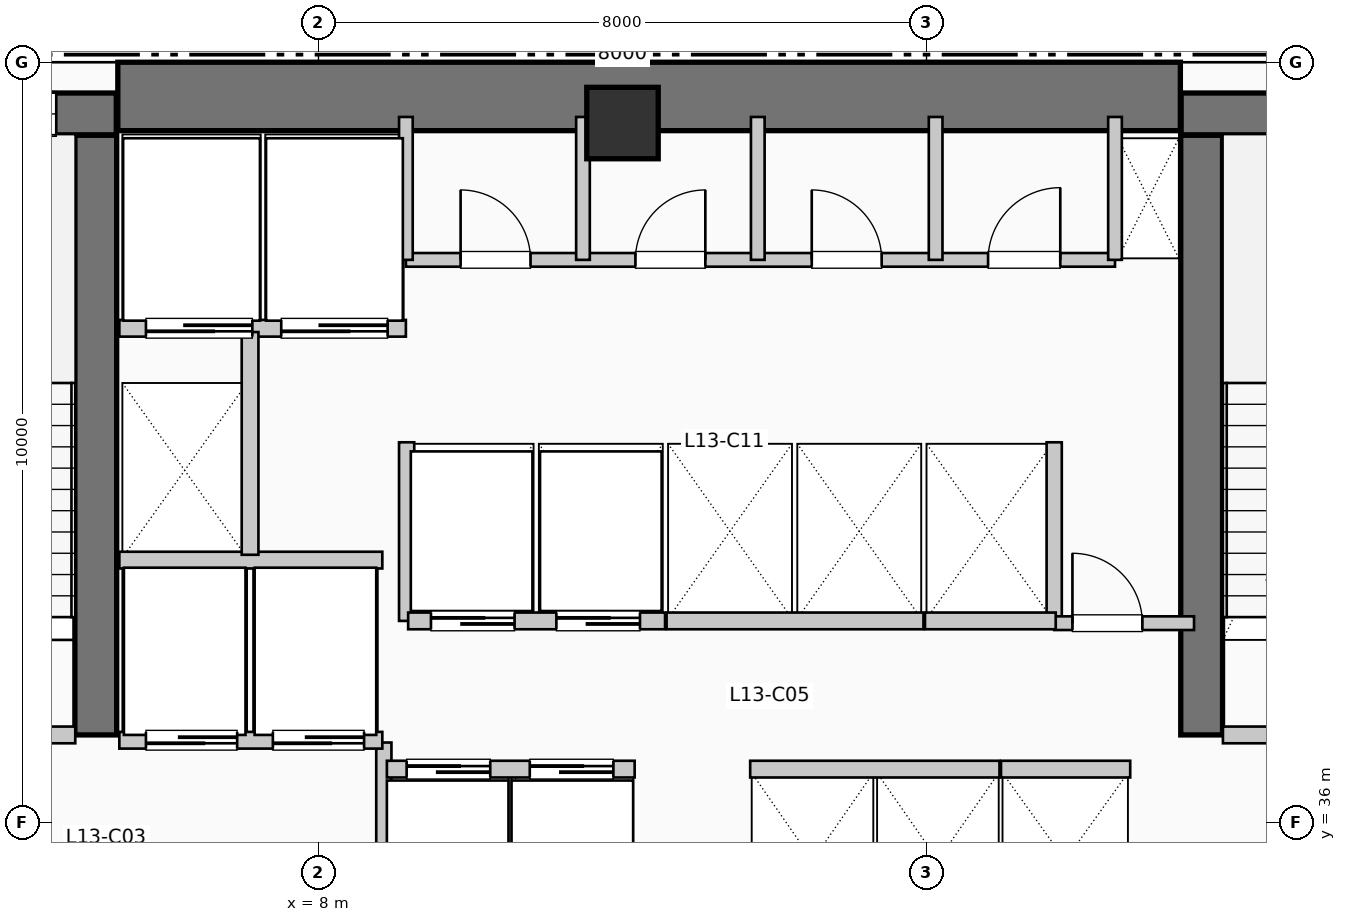
"""IFC4 building model, lengths in metres.
Left out: names, types, materials, properties, quantities, classifications, styles, units other than length and angle.
Written with IfcOpenShell. Run it as: python <this file> out.ifc"""

import sys

from ifc_helpers import new_model, si_unit, direction, frame, frame_2d, origin, origin_2d, place, context, subcontext, project, spatial, rectangle, extrude, element, fill, save


model = new_model("IFC4")
c1 = context("Model", 3, precision=1e-05, world=origin(), true_north=direction((0.0, 1.0)))
c2 = subcontext(c1, "Body", "Model", "MODEL_VIEW")
j1 = project(units=[si_unit("LENGTHUNIT", "METRE"), si_unit("PLANEANGLEUNIT", "RADIAN")], contexts=[c1])
p1 = place(None, origin())
s1 = spatial("IfcSite", under=j1, at=p1, CompositionType="ELEMENT")
p2 = place(p1, origin())
s2 = spatial("IfcBuilding", under=s1, at=p2, CompositionType="ELEMENT")
p3 = place(p2, frame((0.0, 0.0, 58.08)))
s3 = spatial("IfcBuildingStorey", under=s2, at=p3, CompositionType="ELEMENT", Elevation=58.08)
p4 = place(p3, frame((5.36, 45.55, 0.0), z_axis=(0.0, 0.0, 1.0), x_axis=(1.0, 0.0, 0.0)))
e1 = element("IfcWall", 1, at=p4, inside=s3, PredefinedType="SHEAR", context=c2, shape_type="SweptSolid", body=[
    extrude(rectangle(XDim=13.98, YDim=0.9, at=frame_2d((6.99, 0.0))), origin(), (0.0, 0.0, 1.0), 3.96),
])
p5 = place(p3, frame((5.07, 37.15, 0.0), z_axis=(0.0, 0.0, 1.0), x_axis=(0.0, 1.0, 0.0)))
e2 = element("IfcWall", 2, at=p5, inside=s3, PredefinedType="SHEAR", context=c2, shape_type="SweptSolid", body=[
    extrude(rectangle(XDim=7.89, YDim=0.55, at=frame_2d((3.945, 0.0))), origin(), (0.0, 0.0, 1.0), 3.96),
])
p6 = place(p3, frame((1.1, 45.32, 0.0), z_axis=(0.0, 0.0, 1.0), x_axis=(1.0, 0.0, 0.0)))
e3 = element("IfcWall", 3, at=p6, inside=s3, PredefinedType="SHEAR", context=c2, shape_type="SweptSolid", body=[
    extrude(rectangle(XDim=4.24, YDim=0.55, at=frame_2d((2.12, 0.0))), origin(), (0.0, 0.0, 1.0), 3.96),
])
p7 = place(p6, frame((2.05, 0.0, 1.05)))
e4 = element("IfcOpeningElement", 4, at=p7, cuts=e3, PredefinedType="OPENING", context=c2, shape_type="SweptSolid", body=[
    extrude(rectangle(XDim=1.4, YDim=1.8, at=frame_2d((0.7, 0.9))), frame((0.0, 0.285, 0.0), z_axis=(0.0, -1.0, 0.0), x_axis=(1.0, 0.0, 0.0)), (0.0, 0.0, 1.0), 0.57),
])
p8 = place(p3, frame((19.62, 37.15, 0.0), z_axis=(0.0, 0.0, 1.0), x_axis=(0.0, 1.0, 0.0)))
e5 = element("IfcWall", 5, at=p8, inside=s3, PredefinedType="SHEAR", context=c2, shape_type="SweptSolid", body=[
    extrude(rectangle(XDim=7.89, YDim=0.55, at=frame_2d((3.945, 0.0))), origin(), (0.0, 0.0, 1.0), 3.96),
])
p9 = place(p3, frame((19.35, 45.32, 0.0), z_axis=(0.0, 0.0, 1.0), x_axis=(1.0, 0.0, 0.0)))
e6 = element("IfcWall", 6, at=p9, inside=s3, PredefinedType="SHEAR", context=c2, shape_type="SweptSolid", body=[
    extrude(rectangle(XDim=3.69, YDim=0.55, at=frame_2d((1.845, 0.0))), origin(), (0.0, 0.0, 1.0), 3.96),
])
p10 = place(p9, frame((1.15, 0.0, 1.05)))
e7 = element("IfcOpeningElement", 7, at=p10, cuts=e6, PredefinedType="OPENING", context=c2, shape_type="SweptSolid", body=[
    extrude(rectangle(XDim=1.4, YDim=1.8, at=frame_2d((0.7, 0.9))), frame((0.0, 0.285, 0.0), z_axis=(0.0, -1.0, 0.0), x_axis=(1.0, 0.0, 0.0)), (0.0, 0.0, 1.0), 0.57),
])
p11 = place(p3, frame((12.0, 45.2, 0.0), z_axis=(0.0, 0.0, 1.0), x_axis=(1.0, 0.0, 0.0)))
e8 = element("IfcColumn", 8, at=p11, inside=s3, PredefinedType="COLUMN", context=c2, shape_type="SweptSolid", body=[
    extrude(rectangle(XDim=0.94, YDim=0.94, at=origin_2d()), origin(), (0.0, 0.0, 1.0), 3.96),
])
p12 = place(p3, frame((1.65, 37.15, 0.0), z_axis=(0.0, 0.0, 1.0), x_axis=(1.0, 0.0, 0.0)))
e9 = element("IfcWall", 9, at=p12, inside=s3, PredefinedType="PARTITIONING", context=c2, shape_type="SweptSolid", body=[
    extrude(rectangle(XDim=3.15, YDim=0.22, at=frame_2d((1.575, 0.0))), origin(), (0.0, 0.0, 1.0), 3.71),
])
p13 = place(p12, frame((2.05, 0.0, 0.0), z_axis=(0.0, 0.0, 1.0), x_axis=(-1.0, 0.0, 0.0)))
e10 = element("IfcOpeningElement", 10, at=p13, cuts=e9, PredefinedType="OPENING", context=c2, shape_type="SweptSolid", body=[
    extrude(rectangle(XDim=1.05, YDim=2.15, at=frame_2d((0.525, 1.075))), frame((0.0, 0.12, 0.0), z_axis=(0.0, -1.0, 0.0), x_axis=(1.0, 0.0, 0.0)), (0.0, 0.0, 1.0), 0.24),
])
p14 = place(p3, frame((8.86, 34.55, 0.0), z_axis=(0.0, 0.0, 1.0), x_axis=(0.0, 1.0, 0.0)))
e11 = element("IfcWall", 11, at=p14, inside=s3, PredefinedType="PARTITIONING", context=c2, shape_type="SweptSolid", body=[
    extrude(rectangle(XDim=2.5, YDim=0.2, at=frame_2d((1.25, 0.0))), origin(), (0.0, 0.0, 1.0), 3.71),
])
p15 = place(p3, frame((19.9, 37.15, 0.0), z_axis=(0.0, 0.0, 1.0), x_axis=(1.0, 0.0, 0.0)))
e12 = element("IfcWall", 12, at=p15, inside=s3, PredefinedType="PARTITIONING", context=c2, shape_type="SweptSolid", body=[
    extrude(rectangle(XDim=3.15, YDim=0.22, at=frame_2d((1.575, 0.0))), origin(), (0.0, 0.0, 1.0), 3.71),
])
p16 = place(p15, frame((2.05, 0.0, 0.0), z_axis=(0.0, 0.0, 1.0), x_axis=(-1.0, 0.0, 0.0)))
e13 = element("IfcOpeningElement", 13, at=p16, cuts=e12, PredefinedType="OPENING", context=c2, shape_type="SweptSolid", body=[
    extrude(rectangle(XDim=1.05, YDim=2.15, at=frame_2d((0.525, 1.075))), frame((0.0, 0.12, 0.0), z_axis=(0.0, -1.0, 0.0), x_axis=(1.0, 0.0, 0.0)), (0.0, 0.0, 1.0), 0.24),
])
p17 = place(p3, frame((5.38, 37.08, 0.0), z_axis=(0.0, 0.0, 1.0), x_axis=(1.0, 0.0, 0.0)))
e14 = element("IfcWall", 14, at=p17, inside=s3, PredefinedType="PARTITIONING", context=c2, shape_type="SweptSolid", body=[
    extrude(rectangle(XDim=3.46, YDim=0.22, at=frame_2d((1.73, 0.0))), origin(), (0.0, 0.0, 1.0), 3.71),
])
p18 = place(p17, frame((1.55, 0.0, 0.0), z_axis=(0.0, 0.0, 1.0), x_axis=(-1.0, 0.0, 0.0)))
e15 = element("IfcOpeningElement", 15, at=p18, cuts=e14, PredefinedType="OPENING", context=c2, shape_type="SweptSolid", body=[
    extrude(rectangle(XDim=1.2, YDim=2.2, at=frame_2d((0.6, 1.1))), frame((0.0, 0.12, 0.0), z_axis=(0.0, -1.0, 0.0), x_axis=(1.0, 0.0, 0.0)), (0.0, 0.0, 1.0), 0.24),
])
p19 = place(p17, frame((3.22, 0.0, 0.0), z_axis=(0.0, 0.0, 1.0), x_axis=(-1.0, 0.0, 0.0)))
e16 = element("IfcOpeningElement", 16, at=p19, cuts=e14, PredefinedType="OPENING", context=c2, shape_type="SweptSolid", body=[
    extrude(rectangle(XDim=1.2, YDim=2.2, at=frame_2d((0.6, 1.1))), frame((0.0, 0.12, 0.0), z_axis=(0.0, -1.0, 0.0), x_axis=(1.0, 0.0, 0.0)), (0.0, 0.0, 1.0), 0.24),
])
p20 = place(p3, frame((5.38, 39.45, 0.0), z_axis=(0.0, 0.0, 1.0), x_axis=(1.0, 0.0, 0.0)))
e17 = element("IfcWall", 17, at=p20, inside=s3, PredefinedType="PARTITIONING", context=c2, shape_type="SweptSolid", body=[
    extrude(rectangle(XDim=3.46, YDim=0.22, at=frame_2d((1.73, 0.0))), origin(), (0.0, 0.0, 1.0), 3.71),
])
p21 = place(p3, frame((5.38, 42.5, 0.0), z_axis=(0.0, 0.0, 1.0), x_axis=(1.0, 0.0, 0.0)))
e18 = element("IfcWall", 18, at=p21, inside=s3, PredefinedType="PARTITIONING", context=c2, shape_type="SweptSolid", body=[
    extrude(rectangle(XDim=3.77, YDim=0.22, at=frame_2d((1.885, 0.0))), origin(), (0.0, 0.0, 1.0), 3.71),
])
p22 = place(p21, frame((1.75, 0.0, 0.0), z_axis=(0.0, 0.0, 1.0), x_axis=(-1.0, 0.0, 0.0)))
e19 = element("IfcOpeningElement", 19, at=p22, cuts=e18, PredefinedType="OPENING", context=c2, shape_type="SweptSolid", body=[
    extrude(rectangle(XDim=1.4, YDim=2.2, at=frame_2d((0.7, 1.1))), frame((0.0, 0.12, 0.0), z_axis=(0.0, -1.0, 0.0), x_axis=(1.0, 0.0, 0.0)), (0.0, 0.0, 1.0), 0.24),
])
p23 = place(p21, frame((3.53, 0.0, 0.0), z_axis=(0.0, 0.0, 1.0), x_axis=(-1.0, 0.0, 0.0)))
e20 = element("IfcOpeningElement", 20, at=p23, cuts=e18, PredefinedType="OPENING", context=c2, shape_type="SweptSolid", body=[
    extrude(rectangle(XDim=1.4, YDim=2.2, at=frame_2d((0.7, 1.1))), frame((0.0, 0.12, 0.0), z_axis=(0.0, -1.0, 0.0), x_axis=(1.0, 0.0, 0.0)), (0.0, 0.0, 1.0), 0.24),
])
p24 = place(p3, frame((7.1, 39.52, 0.0), z_axis=(0.0, 0.0, 1.0), x_axis=(0.0, 1.0, 0.0)))
e21 = element("IfcWall", 21, at=p24, inside=s3, PredefinedType="PARTITIONING", context=c2, shape_type="SweptSolid", body=[
    extrude(rectangle(XDim=2.93, YDim=0.22, at=frame_2d((1.465, 0.0))), origin(), (0.0, 0.0, 1.0), 3.71),
])
for number, where, z_axis, x_axis in (
    (22, (9.16, 38.65, 0.0), (0.0, 0.0, 1.0), (0.0, 1.0, 0.0)),
    (23, (17.68, 38.65, 0.0), (0.0, 0.0, 1.0), (0.0, 1.0, 0.0)),
):
    element("IfcWall", number, at=place(p3, frame(where, z_axis=z_axis, x_axis=x_axis)), inside=s3, PredefinedType="PARTITIONING", context=c2, shape_type="SweptSolid", body=[
        extrude(rectangle(XDim=2.35, YDim=0.2, at=frame_2d((1.175, 0.0))), origin(), (0.0, 0.0, 1.0), 3.71),
    ])
p25 = place(p3, frame((17.68, 38.62, 0.0), z_axis=(0.0, 0.0, 1.0), x_axis=(1.0, 0.0, 0.0)))
e24 = element("IfcWall", 24, at=p25, inside=s3, PredefinedType="PARTITIONING", context=c2, shape_type="SweptSolid", body=[
    extrude(rectangle(XDim=1.84, YDim=0.18, at=frame_2d((0.92, 0.0))), origin(), (0.0, 0.0, 1.0), 3.71),
])
p26 = place(p25, frame((0.24, 0.0, 0.0)))
e25 = element("IfcOpeningElement", 25, at=p26, cuts=e24, PredefinedType="OPENING", context=c2, shape_type="SweptSolid", body=[
    extrude(rectangle(XDim=0.92, YDim=2.1, at=frame_2d((0.46, 1.05))), frame((0.0, 0.1, 0.0), z_axis=(0.0, -1.0, 0.0), x_axis=(1.0, 0.0, 0.0)), (0.0, 0.0, 1.0), 0.2),
])
p27 = place(p3, frame((8.9, 36.7, 0.0), z_axis=(0.0, 0.0, 1.0), x_axis=(1.0, 0.0, 0.0)))
e26 = element("IfcWall", 26, at=p27, inside=s3, PredefinedType="PARTITIONING", context=c2, shape_type="SweptSolid", body=[
    extrude(rectangle(XDim=3.26, YDim=0.22, at=frame_2d((1.63, 0.0))), origin(), (0.0, 0.0, 1.0), 3.71),
])
p28 = place(p27, frame((0.26, 0.0, 0.0)))
e27 = element("IfcOpeningElement", 27, at=p28, cuts=e26, PredefinedType="OPENING", context=c2, shape_type="SweptSolid", body=[
    extrude(rectangle(XDim=1.1, YDim=2.2, at=frame_2d((0.55, 1.1))), frame((0.0, 0.12, 0.0), z_axis=(0.0, -1.0, 0.0), x_axis=(1.0, 0.0, 0.0)), (0.0, 0.0, 1.0), 0.24),
])
p29 = place(p27, frame((1.88, 0.0, 0.0)))
e28 = element("IfcOpeningElement", 28, at=p29, cuts=e26, PredefinedType="OPENING", context=c2, shape_type="SweptSolid", body=[
    extrude(rectangle(XDim=1.1, YDim=2.2, at=frame_2d((0.55, 1.1))), frame((0.0, 0.12, 0.0), z_axis=(0.0, -1.0, 0.0), x_axis=(1.0, 0.0, 0.0)), (0.0, 0.0, 1.0), 0.24),
])
p30 = place(p3, frame((9.18, 38.65, 0.0), z_axis=(0.0, 0.0, 1.0), x_axis=(1.0, 0.0, 0.0)))
e29 = element("IfcWall", 29, at=p30, inside=s3, PredefinedType="PARTITIONING", context=c2, shape_type="SweptSolid", body=[
    extrude(rectangle(XDim=3.38, YDim=0.22, at=frame_2d((1.69, 0.0))), origin(), (0.0, 0.0, 1.0), 3.71),
])
p31 = place(p30, frame((0.3, 0.0, 0.0)))
e30 = element("IfcOpeningElement", 30, at=p31, cuts=e29, PredefinedType="OPENING", context=c2, shape_type="SweptSolid", body=[
    extrude(rectangle(XDim=1.1, YDim=2.2, at=frame_2d((0.55, 1.1))), frame((0.0, 0.12, 0.0), z_axis=(0.0, -1.0, 0.0), x_axis=(1.0, 0.0, 0.0)), (0.0, 0.0, 1.0), 0.24),
])
p32 = place(p30, frame((1.95, 0.0, 0.0)))
e31 = element("IfcOpeningElement", 31, at=p32, cuts=e29, PredefinedType="OPENING", context=c2, shape_type="SweptSolid", body=[
    extrude(rectangle(XDim=1.1, YDim=2.2, at=frame_2d((0.55, 1.1))), frame((0.0, 0.12, 0.0), z_axis=(0.0, -1.0, 0.0), x_axis=(1.0, 0.0, 0.0)), (0.0, 0.0, 1.0), 0.24),
])
p33 = place(p3, frame((13.68, 36.7, 0.0), z_axis=(0.0, 0.0, 1.0), x_axis=(1.0, 0.0, 0.0)))
e32 = element("IfcWall", 32, at=p33, inside=s3, PredefinedType="PARTITIONING", context=c2, shape_type="SweptSolid", body=[
    extrude(rectangle(XDim=3.28, YDim=0.22, at=frame_2d((1.64, 0.0))), origin(), (0.0, 0.0, 1.0), 3.71),
])
p34 = place(p3, frame((12.58, 38.65, 0.0), z_axis=(0.0, 0.0, 1.0), x_axis=(1.0, 0.0, 0.0)))
e33 = element("IfcWall", 33, at=p34, inside=s3, PredefinedType="PARTITIONING", context=c2, shape_type="SweptSolid", body=[
    extrude(rectangle(XDim=3.38, YDim=0.22, at=frame_2d((1.69, 0.0))), origin(), (0.0, 0.0, 1.0), 3.71),
])
p35 = place(p3, frame((16.98, 36.7, 0.0), z_axis=(0.0, 0.0, 1.0), x_axis=(1.0, 0.0, 0.0)))
e34 = element("IfcWall", 34, at=p35, inside=s3, PredefinedType="PARTITIONING", context=c2, shape_type="SweptSolid", body=[
    extrude(rectangle(XDim=1.7, YDim=0.22, at=frame_2d((0.85, 0.0))), origin(), (0.0, 0.0, 1.0), 3.71),
])
p36 = place(p3, frame((15.98, 38.65, 0.0), z_axis=(0.0, 0.0, 1.0), x_axis=(1.0, 0.0, 0.0)))
e35 = element("IfcWall", 35, at=p36, inside=s3, PredefinedType="PARTITIONING", context=c2, shape_type="SweptSolid", body=[
    extrude(rectangle(XDim=1.72, YDim=0.22, at=frame_2d((0.86, 0.0))), origin(), (0.0, 0.0, 1.0), 3.71),
])
p37 = place(p3, frame((9.15, 43.4, 0.0), z_axis=(0.0, 0.0, 1.0), x_axis=(1.0, 0.0, 0.0)))
e36 = element("IfcWall", 36, at=p37, inside=s3, PredefinedType="PLUMBINGWALL", context=c2, shape_type="SweptSolid", body=[
    extrude(rectangle(XDim=9.33, YDim=0.18, at=frame_2d((4.665, 0.0))), origin(), (0.0, 0.0, 1.0), 3.71),
])
p38 = place(p37, frame((0.72, 0.0, 0.0)))
e37 = element("IfcOpeningElement", 37, at=p38, cuts=e36, PredefinedType="OPENING", context=c2, shape_type="SweptSolid", body=[
    extrude(rectangle(XDim=0.92, YDim=2.1, at=frame_2d((0.46, 1.05))), frame((0.0, 0.1, 0.0), z_axis=(0.0, -1.0, 0.0), x_axis=(1.0, 0.0, 0.0)), (0.0, 0.0, 1.0), 0.2),
])
p39 = place(p37, frame((3.02, 0.0, 0.0)))
e38 = element("IfcOpeningElement", 38, at=p39, cuts=e36, PredefinedType="OPENING", context=c2, shape_type="SweptSolid", body=[
    extrude(rectangle(XDim=0.92, YDim=2.1, at=frame_2d((0.46, 1.05))), frame((0.0, 0.1, 0.0), z_axis=(0.0, -1.0, 0.0), x_axis=(1.0, 0.0, 0.0)), (0.0, 0.0, 1.0), 0.2),
])
p40 = place(p37, frame((5.34, 0.0, 0.0)))
e39 = element("IfcOpeningElement", 39, at=p40, cuts=e36, PredefinedType="OPENING", context=c2, shape_type="SweptSolid", body=[
    extrude(rectangle(XDim=0.92, YDim=2.1, at=frame_2d((0.46, 1.05))), frame((0.0, 0.1, 0.0), z_axis=(0.0, -1.0, 0.0), x_axis=(1.0, 0.0, 0.0)), (0.0, 0.0, 1.0), 0.2),
])
p41 = place(p37, frame((7.66, 0.0, 0.0)))
e40 = element("IfcOpeningElement", 40, at=p41, cuts=e36, PredefinedType="OPENING", context=c2, shape_type="SweptSolid", body=[
    extrude(rectangle(XDim=0.95, YDim=2.1, at=frame_2d((0.475, 1.05))), frame((0.0, 0.1, 0.0), z_axis=(0.0, -1.0, 0.0), x_axis=(1.0, 0.0, 0.0)), (0.0, 0.0, 1.0), 0.2),
])
for number, where, z_axis, x_axis in (
    (41, (9.15, 43.4, 0.0), (0.0, 0.0, 1.0), (0.0, 1.0, 0.0)),
    (42, (18.48, 43.4, 0.0), (0.0, 0.0, 1.0), (0.0, 1.0, 0.0)),
    (43, (11.48, 43.4, 0.0), (0.0, 0.0, 1.0), (0.0, 1.0, 0.0)),
    (44, (13.78, 43.4, 0.0), (0.0, 0.0, 1.0), (0.0, 1.0, 0.0)),
    (45, (16.12, 43.4, 0.0), (0.0, 0.0, 1.0), (0.0, 1.0, 0.0)),
):
    element("IfcWall", number, at=place(p3, frame(where, z_axis=z_axis, x_axis=x_axis)), inside=s3, PredefinedType="PLUMBINGWALL", context=c2, shape_type="SweptSolid", body=[
        extrude(rectangle(XDim=1.88, YDim=0.18, at=frame_2d((0.94, 0.0))), origin(), (0.0, 0.0, 1.0), 3.71),
    ])
p42 = place(p7, origin())
e46 = element("IfcWindow", 46, at=p42, inside=s3, PartitioningType="SINGLE_PANEL", PredefinedType="WINDOW", context=c2, shape_type="SweptSolid", body=[
    extrude(rectangle(XDim=1.4, YDim=1.8, at=frame_2d((0.7, 0.9))), frame((0.0, 0.03, 0.0), z_axis=(0.0, -1.0, 0.0), x_axis=(1.0, 0.0, 0.0)), (0.0, 0.0, 1.0), 0.06),
])
fill(e4, e46)
p43 = place(p18, origin())
e47 = element("IfcDoor", 47, at=p43, inside=s3, OperationType="SLIDING_TO_RIGHT", PredefinedType="DOOR", context=c2, shape_type="SweptSolid", body=[
    extrude(rectangle(XDim=1.2, YDim=2.2, at=frame_2d((0.6, 1.1))), frame((0.0, 0.025, 0.0), z_axis=(0.0, -1.0, 0.0), x_axis=(1.0, 0.0, 0.0)), (0.0, 0.0, 1.0), 0.05),
])
fill(e15, e47)
p44 = place(p19, origin())
e48 = element("IfcDoor", 48, at=p44, inside=s3, OperationType="SLIDING_TO_RIGHT", PredefinedType="DOOR", context=c2, shape_type="SweptSolid", body=[
    extrude(rectangle(XDim=1.2, YDim=2.2, at=frame_2d((0.6, 1.1))), frame((0.0, 0.025, 0.0), z_axis=(0.0, -1.0, 0.0), x_axis=(1.0, 0.0, 0.0)), (0.0, 0.0, 1.0), 0.05),
])
fill(e16, e48)
p45 = place(p22, origin())
e49 = element("IfcDoor", 49, at=p45, inside=s3, OperationType="SLIDING_TO_LEFT", PredefinedType="DOOR", context=c2, shape_type="SweptSolid", body=[
    extrude(rectangle(XDim=1.4, YDim=2.2, at=frame_2d((0.7, 1.1))), frame((0.0, 0.025, 0.0), z_axis=(0.0, -1.0, 0.0), x_axis=(1.0, 0.0, 0.0)), (0.0, 0.0, 1.0), 0.05),
])
fill(e19, e49)
p46 = place(p23, origin())
e50 = element("IfcDoor", 50, at=p46, inside=s3, OperationType="SLIDING_TO_LEFT", PredefinedType="DOOR", context=c2, shape_type="SweptSolid", body=[
    extrude(rectangle(XDim=1.4, YDim=2.2, at=frame_2d((0.7, 1.1))), frame((0.0, 0.025, 0.0), z_axis=(0.0, -1.0, 0.0), x_axis=(1.0, 0.0, 0.0)), (0.0, 0.0, 1.0), 0.05),
])
fill(e20, e50)
p47 = place(p26, origin())
e51 = element("IfcDoor", 51, at=p47, inside=s3, OperationType="SINGLE_SWING_LEFT", PredefinedType="DOOR", context=c2, shape_type="SweptSolid", body=[
    extrude(rectangle(XDim=0.92, YDim=2.1, at=frame_2d((0.46, 1.05))), frame((0.0, 0.025, 0.0), z_axis=(0.0, -1.0, 0.0), x_axis=(1.0, 0.0, 0.0)), (0.0, 0.0, 1.0), 0.05),
])
fill(e25, e51)
p48 = place(p28, origin())
e52 = element("IfcDoor", 52, at=p48, inside=s3, OperationType="SLIDING_TO_LEFT", PredefinedType="DOOR", context=c2, shape_type="SweptSolid", body=[
    extrude(rectangle(XDim=1.1, YDim=2.2, at=frame_2d((0.55, 1.1))), frame((0.0, 0.025, 0.0), z_axis=(0.0, -1.0, 0.0), x_axis=(1.0, 0.0, 0.0)), (0.0, 0.0, 1.0), 0.05),
])
fill(e27, e52)
p49 = place(p29, origin())
e53 = element("IfcDoor", 53, at=p49, inside=s3, OperationType="SLIDING_TO_LEFT", PredefinedType="DOOR", context=c2, shape_type="SweptSolid", body=[
    extrude(rectangle(XDim=1.1, YDim=2.2, at=frame_2d((0.55, 1.1))), frame((0.0, 0.025, 0.0), z_axis=(0.0, -1.0, 0.0), x_axis=(1.0, 0.0, 0.0)), (0.0, 0.0, 1.0), 0.05),
])
fill(e28, e53)
p50 = place(p31, origin())
e54 = element("IfcDoor", 54, at=p50, inside=s3, OperationType="SLIDING_TO_LEFT", PredefinedType="DOOR", context=c2, shape_type="SweptSolid", body=[
    extrude(rectangle(XDim=1.1, YDim=2.2, at=frame_2d((0.55, 1.1))), frame((0.0, 0.025, 0.0), z_axis=(0.0, -1.0, 0.0), x_axis=(1.0, 0.0, 0.0)), (0.0, 0.0, 1.0), 0.05),
])
fill(e30, e54)
p51 = place(p32, origin())
e55 = element("IfcDoor", 55, at=p51, inside=s3, OperationType="SLIDING_TO_LEFT", PredefinedType="DOOR", context=c2, shape_type="SweptSolid", body=[
    extrude(rectangle(XDim=1.1, YDim=2.2, at=frame_2d((0.55, 1.1))), frame((0.0, 0.025, 0.0), z_axis=(0.0, -1.0, 0.0), x_axis=(1.0, 0.0, 0.0)), (0.0, 0.0, 1.0), 0.05),
])
fill(e31, e55)
p52 = place(p38, origin())
e56 = element("IfcDoor", 56, at=p52, inside=s3, OperationType="SINGLE_SWING_LEFT", PredefinedType="DOOR", context=c2, shape_type="SweptSolid", body=[
    extrude(rectangle(XDim=0.92, YDim=2.1, at=frame_2d((0.46, 1.05))), frame((0.0, 0.025, 0.0), z_axis=(0.0, -1.0, 0.0), x_axis=(1.0, 0.0, 0.0)), (0.0, 0.0, 1.0), 0.05),
])
fill(e37, e56)
p53 = place(p39, origin())
e57 = element("IfcDoor", 57, at=p53, inside=s3, OperationType="SINGLE_SWING_RIGHT", PredefinedType="DOOR", context=c2, shape_type="SweptSolid", body=[
    extrude(rectangle(XDim=0.92, YDim=2.1, at=frame_2d((0.46, 1.05))), frame((0.0, 0.025, 0.0), z_axis=(0.0, -1.0, 0.0), x_axis=(1.0, 0.0, 0.0)), (0.0, 0.0, 1.0), 0.05),
])
fill(e38, e57)
p54 = place(p40, origin())
e58 = element("IfcDoor", 58, at=p54, inside=s3, OperationType="SINGLE_SWING_LEFT", PredefinedType="DOOR", context=c2, shape_type="SweptSolid", body=[
    extrude(rectangle(XDim=0.92, YDim=2.1, at=frame_2d((0.46, 1.05))), frame((0.0, 0.025, 0.0), z_axis=(0.0, -1.0, 0.0), x_axis=(1.0, 0.0, 0.0)), (0.0, 0.0, 1.0), 0.05),
])
fill(e39, e58)
p55 = place(p41, origin())
e59 = element("IfcDoor", 59, at=p55, inside=s3, OperationType="SINGLE_SWING_RIGHT", PredefinedType="DOOR", context=c2, shape_type="SweptSolid", body=[
    extrude(rectangle(XDim=0.95, YDim=2.1, at=frame_2d((0.475, 1.05))), frame((0.0, 0.025, 0.0), z_axis=(0.0, -1.0, 0.0), x_axis=(1.0, 0.0, 0.0)), (0.0, 0.0, 1.0), 0.05),
])
fill(e40, e59)
save(model, sys.argv[1])
